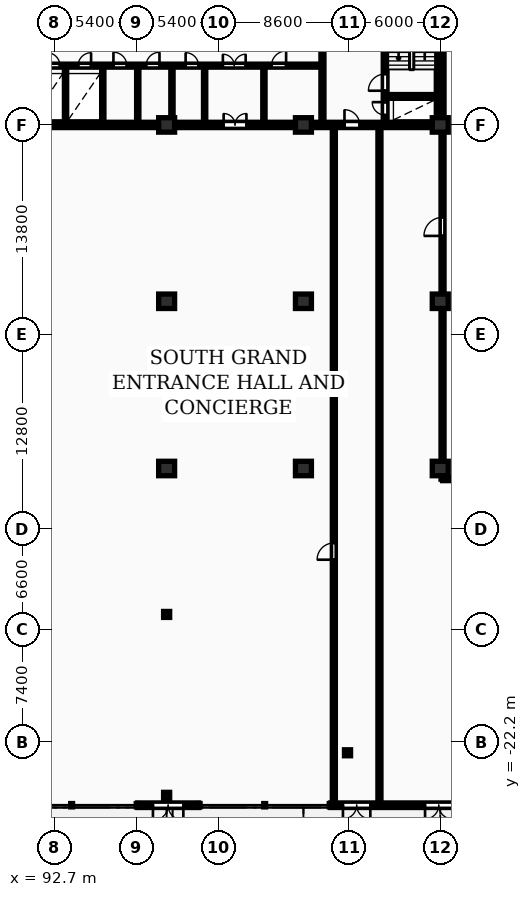
"""IFC4 building model, lengths in metres.
Left out: names, types, materials, properties, quantities, classifications, styles, units other than length and angle.
Written with IfcOpenShell. Run it as: python <this file> out.ifc"""

import sys

from ifc_helpers import new_model, si_unit, direction, frame, frame_2d, origin, origin_2d, place, context, subcontext, project, spatial, rectangle, i_section, extrude, element, fill, save


model = new_model("IFC4")
c1 = context("Model", 3, precision=1e-05, world=origin(), true_north=direction((0.0, 1.0)))
c2 = subcontext(c1, "Body", "Model", "MODEL_VIEW")
j1 = project(units=[si_unit("LENGTHUNIT", "METRE"), si_unit("PLANEANGLEUNIT", "RADIAN")], contexts=[c1])
p1 = place(None, origin())
s1 = spatial("IfcSite", under=j1, at=p1, CompositionType="ELEMENT")
p2 = place(p1, origin())
s2 = spatial("IfcBuilding", under=s1, at=p2, CompositionType="ELEMENT")
p3 = place(p2, origin())
s3 = spatial("IfcBuildingStorey", under=s2, at=p3, CompositionType="ELEMENT", Elevation=0.0)
for number, where, z_axis, x_axis in (
    (1, (100.1, -4.2, 0.0), (0.0, 0.0, 1.0), (1.0, 0.0, 0.0)),
    (2, (100.1, 6.8, 0.0), (0.0, 0.0, 1.0), (1.0, 0.0, 0.0)),
    (3, (100.1, 18.4, 0.0), (0.0, 0.0, 1.0), (1.0, 0.0, 0.0)),
    (4, (109.1, -4.2, 0.0), (0.0, 0.0, 1.0), (1.0, 0.0, 0.0)),
    (5, (109.1, 6.8, 0.0), (0.0, 0.0, 1.0), (1.0, 0.0, 0.0)),
    (6, (109.1, 18.4, 0.0), (0.0, 0.0, 1.0), (1.0, 0.0, 0.0)),
    (7, (118.1, -4.2, 0.0), (0.0, 0.0, 1.0), (1.0, 0.0, 0.0)),
    (8, (118.1, 6.8, 0.0), (0.0, 0.0, 1.0), (1.0, 0.0, 0.0)),
    (9, (118.1, 18.4, 0.0), (0.0, 0.0, 1.0), (1.0, 0.0, 0.0)),
):
    element("IfcColumn", number, at=place(p3, frame(where, z_axis=z_axis, x_axis=x_axis)), inside=s3, PredefinedType="COLUMN", context=c2, shape_type="SweptSolid", body=[
        extrude(rectangle(XDim=1.05, YDim=0.95, at=origin_2d()), origin(), (0.0, 0.0, 1.0), 5.4),
    ])
for number, where, z_axis, x_axis in (
    (10, (100.1, -13.8, 0.0), (0.0, 0.0, 1.0), (1.0, 0.0, 0.0)),
    (11, (112.0, -22.9, 0.0), (0.0, 0.0, 1.0), (1.0, 0.0, 0.0)),
    (12, (100.1, -25.7, 0.0), (0.0, 0.0, 1.0), (1.0, 0.0, 0.0)),
):
    element("IfcColumn", number, at=place(p3, frame(where, z_axis=z_axis, x_axis=x_axis)), inside=s3, PredefinedType="COLUMN", context=c2, shape_type="SweptSolid", body=[
        extrude(i_section(OverallWidth=0.399, OverallDepth=0.394, WebThickness=0.023, FlangeThickness=0.037, FilletRadius=0.015, at=origin_2d()), origin(), (0.0, 0.0, 1.0), 5.4),
    ])
p4 = place(p3, frame((98.2, -26.35, 0.0), z_axis=(0.0, 0.0, 1.0), x_axis=(1.0, 0.0, 0.0)))
e13 = element("IfcWall", 13, at=p4, inside=s3, PredefinedType="STANDARD", context=c2, shape_type="SweptSolid", body=[
    extrude(rectangle(XDim=4.0, YDim=0.3, at=frame_2d((2.0, 0.0))), origin(), (0.0, 0.0, 1.0), 5.1),
])
p5 = place(p4, frame((1.0, 0.0, 0.0)))
e14 = element("IfcOpeningElement", 14, at=p5, cuts=e13, PredefinedType="OPENING", context=c2, shape_type="SweptSolid", body=[
    extrude(rectangle(XDim=2.0, YDim=2.6, at=frame_2d((1.0, 1.3))), frame((0.0, 0.16, 0.0), z_axis=(0.0, -1.0, 0.0), x_axis=(1.0, 0.0, 0.0)), (0.0, 0.0, 1.0), 0.32),
])
p6 = place(p3, frame((110.9, -26.35, 0.0), z_axis=(0.0, 0.0, 1.0), x_axis=(1.0, 0.0, 0.0)))
e15 = element("IfcWall", 15, at=p6, inside=s3, PredefinedType="STANDARD", context=c2, shape_type="SweptSolid", body=[
    extrude(rectangle(XDim=42.6, YDim=0.3, at=frame_2d((21.3, 0.0))), origin(), (0.0, 0.0, 1.0), 5.1),
])
p7 = place(p6, frame((0.8, 0.0, 0.0)))
e16 = element("IfcOpeningElement", 16, at=p7, cuts=e15, PredefinedType="OPENING", context=c2, shape_type="SweptSolid", body=[
    extrude(rectangle(XDim=1.8, YDim=2.2, at=frame_2d((0.9, 1.1))), frame((0.0, 0.16, 0.0), z_axis=(0.0, -1.0, 0.0), x_axis=(1.0, 0.0, 0.0)), (0.0, 0.0, 1.0), 0.32),
])
p8 = place(p6, frame((6.2, 0.0, 0.0)))
e17 = element("IfcOpeningElement", 17, at=p8, cuts=e15, PredefinedType="OPENING", context=c2, shape_type="SweptSolid", body=[
    extrude(rectangle(XDim=1.8, YDim=2.2, at=frame_2d((0.9, 1.1))), frame((0.0, 0.16, 0.0), z_axis=(0.0, -1.0, 0.0), x_axis=(1.0, 0.0, 0.0)), (0.0, 0.0, 1.0), 0.32),
])
p9 = place(p6, frame((16.0, 0.0, 0.0)))
e18 = element("IfcOpeningElement", 18, at=p9, cuts=e15, PredefinedType="OPENING", context=c2, shape_type="SweptSolid", body=[
    extrude(rectangle(XDim=2.0, YDim=2.6, at=frame_2d((1.0, 1.3))), frame((0.0, 0.16, 0.0), z_axis=(0.0, -1.0, 0.0), x_axis=(1.0, 0.0, 0.0)), (0.0, 0.0, 1.0), 0.32),
])
p10 = place(p6, frame((31.0, 0.0, 0.0)))
e19 = element("IfcOpeningElement", 19, at=p10, cuts=e15, PredefinedType="OPENING", context=c2, shape_type="SweptSolid", body=[
    extrude(rectangle(XDim=2.0, YDim=2.6, at=frame_2d((1.0, 1.3))), frame((0.0, 0.16, 0.0), z_axis=(0.0, -1.0, 0.0), x_axis=(1.0, 0.0, 0.0)), (0.0, 0.0, 1.0), 0.32),
])
p11 = place(p6, frame((24.0, 0.0, 0.9)))
e20 = element("IfcOpeningElement", 20, at=p11, cuts=e15, PredefinedType="OPENING", context=c2, shape_type="SweptSolid", body=[
    extrude(rectangle(XDim=3.0, YDim=2.6, at=frame_2d((1.5, 1.3))), frame((0.0, 0.16, 0.0), z_axis=(0.0, -1.0, 0.0), x_axis=(1.0, 0.0, 0.0)), (0.0, 0.0, 1.0), 0.32),
])
p12 = place(p3, frame((118.015, 18.575, 0.0), z_axis=(0.0, 0.0, 1.0), x_axis=(0.0, 1.0, 0.0)))
e21 = element("IfcWall", 21, at=p12, inside=s3, PredefinedType="SHEAR", context=c2, shape_type="SweptSolid", body=[
    extrude(rectangle(XDim=11.65, YDim=0.35, at=frame_2d((5.825, 0.0))), origin(), (0.0, 0.0, 1.0), 5.4),
])
p13 = place(p3, frame((81.925, 18.4, 0.0), z_axis=(0.0, 0.0, 1.0), x_axis=(1.0, 0.0, 0.0)))
e22 = element("IfcWall", 22, at=p13, inside=s3, PredefinedType="SHEAR", context=c2, shape_type="SweptSolid", body=[
    extrude(rectangle(XDim=36.265, YDim=0.35, at=frame_2d((18.132, 0.0))), origin(), (0.0, 0.0, 1.0), 5.4),
])
p14 = place(p13, frame((5.675, 0.0, 0.0)))
e23 = element("IfcOpeningElement", 23, at=p14, cuts=e22, PredefinedType="OPENING", context=c2, shape_type="SweptSolid", body=[
    extrude(rectangle(XDim=1.0, YDim=2.15, at=frame_2d((0.5, 1.075))), frame((0.0, 0.185, 0.0), z_axis=(0.0, -1.0, 0.0), x_axis=(1.0, 0.0, 0.0)), (0.0, 0.0, 1.0), 0.37),
])
p15 = place(p13, frame((21.925, 0.0, 0.0)))
e24 = element("IfcOpeningElement", 24, at=p15, cuts=e22, PredefinedType="OPENING", context=c2, shape_type="SweptSolid", body=[
    extrude(rectangle(XDim=1.5, YDim=2.2, at=frame_2d((0.75, 1.1))), frame((0.0, 0.185, 0.0), z_axis=(0.0, -1.0, 0.0), x_axis=(1.0, 0.0, 0.0)), (0.0, 0.0, 1.0), 0.37),
])
p16 = place(p13, frame((29.875, 0.0, 0.0)))
e25 = element("IfcOpeningElement", 25, at=p16, cuts=e22, PredefinedType="OPENING", context=c2, shape_type="SweptSolid", body=[
    extrude(rectangle(XDim=1.0, YDim=2.15, at=frame_2d((0.5, 1.075))), frame((0.0, 0.185, 0.0), z_axis=(0.0, -1.0, 0.0), x_axis=(1.0, 0.0, 0.0)), (0.0, 0.0, 1.0), 0.37),
])
for number, where, z_axis, x_axis in (
    (26, (93.45, 18.6, 0.0), (0.0, 0.0, 1.0), (0.0, 1.0, 0.0)),
    (27, (95.9, 18.6, 0.0), (0.0, 0.0, 1.0), (0.0, 1.0, 0.0)),
    (28, (98.2, 18.6, 0.0), (0.0, 0.0, 1.0), (0.0, 1.0, 0.0)),
):
    element("IfcWall", number, at=place(p3, frame(where, z_axis=z_axis, x_axis=x_axis)), inside=s3, PredefinedType="PARTITIONING", context=c2, shape_type="SweptSolid", body=[
        extrude(rectangle(XDim=3.6, YDim=0.15, at=frame_2d((1.8, 0.0))), origin(), (0.0, 0.0, 1.0), 5.1),
    ])
p17 = place(p3, frame((100.45, 18.6, 0.0), z_axis=(0.0, 0.0, 1.0), x_axis=(0.0, 1.0, 0.0)))
e29 = element("IfcWall", 29, at=p17, inside=s3, PredefinedType="PARTITIONING", context=c2, shape_type="SweptSolid", body=[
    extrude(rectangle(XDim=3.6, YDim=0.15, at=frame_2d((1.8, 0.0))), origin(), (0.0, 0.0, 1.0), 4.35),
])
for number, where, z_axis, x_axis in (
    (30, (102.6, 18.6, 0.0), (0.0, 0.0, 1.0), (0.0, 1.0, 0.0)),
    (31, (106.5, 18.6, 0.0), (0.0, 0.0, 1.0), (0.0, 1.0, 0.0)),
):
    element("IfcWall", number, at=place(p3, frame(where, z_axis=z_axis, x_axis=x_axis)), inside=s3, PredefinedType="PARTITIONING", context=c2, shape_type="SweptSolid", body=[
        extrude(rectangle(XDim=3.6, YDim=0.15, at=frame_2d((1.8, 0.0))), origin(), (0.0, 0.0, 1.0), 5.1),
    ])
p18 = place(p3, frame((91.08, 22.3, 0.0), z_axis=(0.0, 0.0, 1.0), x_axis=(1.0, 0.0, 0.0)))
e32 = element("IfcWall", 32, at=p18, inside=s3, PredefinedType="PARTITIONING", context=c2, shape_type="SweptSolid", body=[
    extrude(rectangle(XDim=19.14, YDim=0.2, at=frame_2d((9.57, 0.0))), origin(), (0.0, 0.0, 1.0), 5.1),
])
p19 = place(p18, frame((1.15, 0.0, 0.0)))
e33 = element("IfcOpeningElement", 33, at=p19, cuts=e32, PredefinedType="OPENING", context=c2, shape_type="SweptSolid", body=[
    extrude(rectangle(XDim=0.85, YDim=2.05, at=frame_2d((0.425, 1.025))), frame((0.0, 0.11, 0.0), z_axis=(0.0, -1.0, 0.0), x_axis=(1.0, 0.0, 0.0)), (0.0, 0.0, 1.0), 0.22),
])
p20 = place(p18, frame((3.2, 0.0, 0.0)))
e34 = element("IfcOpeningElement", 34, at=p20, cuts=e32, PredefinedType="OPENING", context=c2, shape_type="SweptSolid", body=[
    extrude(rectangle(XDim=0.85, YDim=2.05, at=frame_2d((0.425, 1.025))), frame((0.0, 0.11, 0.0), z_axis=(0.0, -1.0, 0.0), x_axis=(1.0, 0.0, 0.0)), (0.0, 0.0, 1.0), 0.22),
])
p21 = place(p18, frame((12.72, 0.0, 0.0)))
e35 = element("IfcOpeningElement", 35, at=p21, cuts=e32, PredefinedType="OPENING", context=c2, shape_type="SweptSolid", body=[
    extrude(rectangle(XDim=1.5, YDim=2.2, at=frame_2d((0.75, 1.1))), frame((0.0, 0.11, 0.0), z_axis=(0.0, -1.0, 0.0), x_axis=(1.0, 0.0, 0.0)), (0.0, 0.0, 1.0), 0.22),
])
p22 = place(p18, frame((5.52, 0.0, 0.0)))
e36 = element("IfcOpeningElement", 36, at=p22, cuts=e32, PredefinedType="OPENING", context=c2, shape_type="SweptSolid", body=[
    extrude(rectangle(XDim=0.88, YDim=2.06, at=frame_2d((0.44, 1.03))), frame((0.0, 0.11, 0.0), z_axis=(0.0, -1.0, 0.0), x_axis=(1.0, 0.0, 0.0)), (0.0, 0.0, 1.0), 0.22),
])
p23 = place(p18, frame((7.67, 0.0, 0.0)))
e37 = element("IfcOpeningElement", 37, at=p23, cuts=e32, PredefinedType="OPENING", context=c2, shape_type="SweptSolid", body=[
    extrude(rectangle(XDim=0.88, YDim=2.06, at=frame_2d((0.44, 1.03))), frame((0.0, 0.11, 0.0), z_axis=(0.0, -1.0, 0.0), x_axis=(1.0, 0.0, 0.0)), (0.0, 0.0, 1.0), 0.22),
])
p24 = place(p18, frame((10.27, 0.0, 0.0)))
e38 = element("IfcOpeningElement", 38, at=p24, cuts=e32, PredefinedType="OPENING", context=c2, shape_type="SweptSolid", body=[
    extrude(rectangle(XDim=0.85, YDim=2.05, at=frame_2d((0.425, 1.025))), frame((0.0, 0.11, 0.0), z_axis=(0.0, -1.0, 0.0), x_axis=(1.0, 0.0, 0.0)), (0.0, 0.0, 1.0), 0.22),
])
p25 = place(p18, frame((15.92, 0.0, 0.0)))
e39 = element("IfcOpeningElement", 39, at=p25, cuts=e32, PredefinedType="OPENING", context=c2, shape_type="SweptSolid", body=[
    extrude(rectangle(XDim=0.96, YDim=2.1, at=frame_2d((0.48, 1.05))), frame((0.0, 0.11, 0.0), z_axis=(0.0, -1.0, 0.0), x_axis=(1.0, 0.0, 0.0)), (0.0, 0.0, 1.0), 0.22),
])
p26 = place(p3, frame((110.35, 18.6, 0.0), z_axis=(0.0, 0.0, 1.0), x_axis=(0.0, 1.0, 0.0)))
e40 = element("IfcWall", 40, at=p26, inside=s3, PredefinedType="PARTITIONING", context=c2, shape_type="SweptSolid", body=[
    extrude(rectangle(XDim=11.6, YDim=0.2, at=frame_2d((5.8, 0.0))), origin(), (0.0, 0.0, 1.0), 5.1),
])
p27 = place(p26, frame((5.2, 0.0, 0.0)))
e41 = element("IfcOpeningElement", 41, at=p27, cuts=e40, PredefinedType="OPENING", context=c2, shape_type="SweptSolid", body=[
    extrude(rectangle(XDim=1.1, YDim=2.15, at=frame_2d((0.55, 1.075))), frame((0.0, 0.11, 0.0), z_axis=(0.0, -1.0, 0.0), x_axis=(1.0, 0.0, 0.0)), (0.0, 0.0, 1.0), 0.22),
])
p28 = place(p3, frame((114.475, 18.6, 0.0), z_axis=(0.0, 0.0, 1.0), x_axis=(0.0, 1.0, 0.0)))
e42 = element("IfcWall", 42, at=p28, inside=s3, PredefinedType="SHEAR", context=c2, shape_type="SweptSolid", body=[
    extrude(rectangle(XDim=11.6, YDim=0.25, at=frame_2d((5.8, 0.0))), origin(), (0.0, 0.0, 1.0), 5.4),
])
p29 = place(p28, frame((0.45, 0.0, 0.0)))
e43 = element("IfcOpeningElement", 43, at=p29, cuts=e42, PredefinedType="OPENING", context=c2, shape_type="SweptSolid", body=[
    extrude(rectangle(XDim=0.85, YDim=2.05, at=frame_2d((0.425, 1.025))), frame((0.0, 0.135, 0.0), z_axis=(0.0, -1.0, 0.0), x_axis=(1.0, 0.0, 0.0)), (0.0, 0.0, 1.0), 0.27),
])
p30 = place(p28, frame((2.05, 0.0, 0.0)))
e44 = element("IfcOpeningElement", 44, at=p30, cuts=e42, PredefinedType="OPENING", context=c2, shape_type="SweptSolid", body=[
    extrude(rectangle(XDim=1.1, YDim=2.1, at=frame_2d((0.55, 1.05))), frame((0.0, 0.135, 0.0), z_axis=(0.0, -1.0, 0.0), x_axis=(1.0, 0.0, 0.0)), (0.0, 0.0, 1.0), 0.27),
])
p31 = place(p28, frame((9.95, 0.0, 0.0)))
e45 = element("IfcOpeningElement", 45, at=p31, cuts=e42, PredefinedType="OPENING", context=c2, shape_type="SweptSolid", body=[
    extrude(rectangle(XDim=0.85, YDim=2.05, at=frame_2d((0.425, 1.025))), frame((0.0, 0.135, 0.0), z_axis=(0.0, -1.0, 0.0), x_axis=(1.0, 0.0, 0.0)), (0.0, 0.0, 1.0), 0.27),
])
p32 = place(p3, frame((114.6, 20.275, 0.0), z_axis=(0.0, 0.0, 1.0), x_axis=(1.0, 0.0, 0.0)))
e46 = element("IfcWall", 46, at=p32, inside=s3, PredefinedType="SHEAR", context=c2, shape_type="SweptSolid", body=[
    extrude(rectangle(XDim=3.24, YDim=0.25, at=frame_2d((1.62, 0.0))), origin(), (0.0, 0.0, 1.0), 5.4),
])
p33 = place(p3, frame((111.1, -26.2, 0.0), z_axis=(0.0, 0.0, 1.0), x_axis=(0.0, 1.0, 0.0)))
e47 = element("IfcWall", 47, at=p33, inside=s3, PredefinedType="PARTITIONING", context=c2, shape_type="SweptSolid", body=[
    extrude(rectangle(XDim=44.35, YDim=0.2, at=frame_2d((22.175, 0.0))), origin(), (0.0, 0.0, 1.0), 5.1),
])
p34 = place(p33, frame((16.0, 0.0, 0.0)))
e48 = element("IfcOpeningElement", 48, at=p34, cuts=e47, PredefinedType="OPENING", context=c2, shape_type="SweptSolid", body=[
    extrude(rectangle(XDim=1.1, YDim=2.1, at=frame_2d((0.55, 1.05))), frame((0.0, 0.11, 0.0), z_axis=(0.0, -1.0, 0.0), x_axis=(1.0, 0.0, 0.0)), (0.0, 0.0, 1.0), 0.22),
])
p35 = place(p3, frame((114.1, -26.2, 0.0), z_axis=(0.0, 0.0, 1.0), x_axis=(0.0, 1.0, 0.0)))
e49 = element("IfcWall", 49, at=p35, inside=s3, PredefinedType="PARTITIONING", context=c2, shape_type="SweptSolid", body=[
    extrude(rectangle(XDim=44.35, YDim=0.2, at=frame_2d((22.175, 0.0))), origin(), (0.0, 0.0, 1.0), 5.1),
])
p36 = place(p3, frame((118.25, -4.9, 0.0), z_axis=(0.0, 0.0, 1.0), x_axis=(0.0, 1.0, 0.0)))
e50 = element("IfcWall", 50, at=p36, inside=s3, PredefinedType="PARTITIONING", context=c2, shape_type="SweptSolid", body=[
    extrude(rectangle(XDim=35.35, YDim=0.2, at=frame_2d((17.675, 0.0))), origin(), (0.0, 0.0, 1.0), 4.35),
])
p37 = place(p36, frame((16.0, 0.0, 0.0)))
e51 = element("IfcOpeningElement", 51, at=p37, cuts=e50, PredefinedType="OPENING", context=c2, shape_type="SweptSolid", body=[
    extrude(rectangle(XDim=1.22, YDim=2.18, at=frame_2d((0.61, 1.09))), frame((0.0, 0.11, 0.0), z_axis=(0.0, -1.0, 0.0), x_axis=(1.0, 0.0, 0.0)), (0.0, 0.0, 1.0), 0.22),
])
p38 = place(p3, frame((118.25, -4.9, 0.0), z_axis=(0.0, 0.0, 1.0), x_axis=(1.0, 0.0, 0.0)))
e52 = element("IfcWall", 52, at=p38, inside=s3, PredefinedType="PARTITIONING", context=c2, shape_type="SweptSolid", body=[
    extrude(rectangle(XDim=12.45, YDim=0.2, at=frame_2d((6.225, 0.0))), origin(), (0.0, 0.0, 1.0), 5.1),
])
p39 = place(p5, frame((2.0, 0.0, 0.0), z_axis=(0.0, 0.0, 1.0), x_axis=(-1.0, 0.0, 0.0)))
e53 = element("IfcDoor", 53, at=p39, inside=s3, OperationType="DOUBLE_DOOR_SINGLE_SWING", PredefinedType="DOOR", context=c2, shape_type="SweptSolid", body=[
    extrude(rectangle(XDim=2.0, YDim=2.6, at=frame_2d((1.0, 1.3))), frame((0.0, 0.025, 0.0), z_axis=(0.0, -1.0, 0.0), x_axis=(1.0, 0.0, 0.0)), (0.0, 0.0, 1.0), 0.05),
])
fill(e14, e53)
p40 = place(p7, frame((1.8, 0.0, 0.0), z_axis=(0.0, 0.0, 1.0), x_axis=(-1.0, 0.0, 0.0)))
e54 = element("IfcDoor", 54, at=p40, inside=s3, OperationType="DOUBLE_DOOR_SINGLE_SWING", PredefinedType="DOOR", context=c2, shape_type="SweptSolid", body=[
    extrude(rectangle(XDim=1.8, YDim=2.2, at=frame_2d((0.9, 1.1))), frame((0.0, 0.025, 0.0), z_axis=(0.0, -1.0, 0.0), x_axis=(1.0, 0.0, 0.0)), (0.0, 0.0, 1.0), 0.05),
])
fill(e16, e54)
p41 = place(p8, frame((1.8, 0.0, 0.0), z_axis=(0.0, 0.0, 1.0), x_axis=(-1.0, 0.0, 0.0)))
e55 = element("IfcDoor", 55, at=p41, inside=s3, OperationType="DOUBLE_DOOR_SINGLE_SWING", PredefinedType="DOOR", context=c2, shape_type="SweptSolid", body=[
    extrude(rectangle(XDim=1.8, YDim=2.2, at=frame_2d((0.9, 1.1))), frame((0.0, 0.025, 0.0), z_axis=(0.0, -1.0, 0.0), x_axis=(1.0, 0.0, 0.0)), (0.0, 0.0, 1.0), 0.05),
])
fill(e17, e55)
p42 = place(p15, origin())
e56 = element("IfcDoor", 56, at=p42, inside=s3, OperationType="DOUBLE_DOOR_SINGLE_SWING", PredefinedType="DOOR", context=c2, shape_type="SweptSolid", body=[
    extrude(rectangle(XDim=1.5, YDim=2.2, at=frame_2d((0.75, 1.1))), frame((0.0, 0.025, 0.0), z_axis=(0.0, -1.0, 0.0), x_axis=(1.0, 0.0, 0.0)), (0.0, 0.0, 1.0), 0.05),
])
fill(e24, e56)
p43 = place(p16, origin())
e57 = element("IfcDoor", 57, at=p43, inside=s3, OperationType="SINGLE_SWING_LEFT", PredefinedType="DOOR", context=c2, shape_type="SweptSolid", body=[
    extrude(rectangle(XDim=1.0, YDim=2.15, at=frame_2d((0.5, 1.075))), frame((0.0, 0.025, 0.0), z_axis=(0.0, -1.0, 0.0), x_axis=(1.0, 0.0, 0.0)), (0.0, 0.0, 1.0), 0.05),
])
fill(e25, e57)
p44 = place(p19, origin())
e58 = element("IfcDoor", 58, at=p44, inside=s3, OperationType="SINGLE_SWING_LEFT", PredefinedType="DOOR", context=c2, shape_type="SweptSolid", body=[
    extrude(rectangle(XDim=0.85, YDim=2.05, at=frame_2d((0.425, 1.025))), frame((0.0, 0.025, 0.0), z_axis=(0.0, -1.0, 0.0), x_axis=(1.0, 0.0, 0.0)), (0.0, 0.0, 1.0), 0.05),
])
fill(e33, e58)
p45 = place(p20, origin())
e59 = element("IfcDoor", 59, at=p45, inside=s3, OperationType="SINGLE_SWING_RIGHT", PredefinedType="DOOR", context=c2, shape_type="SweptSolid", body=[
    extrude(rectangle(XDim=0.85, YDim=2.05, at=frame_2d((0.425, 1.025))), frame((0.0, 0.025, 0.0), z_axis=(0.0, -1.0, 0.0), x_axis=(1.0, 0.0, 0.0)), (0.0, 0.0, 1.0), 0.05),
])
fill(e34, e59)
p46 = place(p21, origin())
e60 = element("IfcDoor", 60, at=p46, inside=s3, OperationType="DOUBLE_DOOR_SINGLE_SWING", PredefinedType="DOOR", context=c2, shape_type="SweptSolid", body=[
    extrude(rectangle(XDim=1.5, YDim=2.2, at=frame_2d((0.75, 1.1))), frame((0.0, 0.025, 0.0), z_axis=(0.0, -1.0, 0.0), x_axis=(1.0, 0.0, 0.0)), (0.0, 0.0, 1.0), 0.05),
])
fill(e35, e60)
p47 = place(p22, origin())
e61 = element("IfcDoor", 61, at=p47, inside=s3, OperationType="SINGLE_SWING_LEFT", PredefinedType="DOOR", context=c2, shape_type="SweptSolid", body=[
    extrude(rectangle(XDim=0.88, YDim=2.06, at=frame_2d((0.44, 1.03))), frame((0.0, 0.025, 0.0), z_axis=(0.0, -1.0, 0.0), x_axis=(1.0, 0.0, 0.0)), (0.0, 0.0, 1.0), 0.05),
])
fill(e36, e61)
p48 = place(p23, origin())
e62 = element("IfcDoor", 62, at=p48, inside=s3, OperationType="SINGLE_SWING_RIGHT", PredefinedType="DOOR", context=c2, shape_type="SweptSolid", body=[
    extrude(rectangle(XDim=0.88, YDim=2.06, at=frame_2d((0.44, 1.03))), frame((0.0, 0.025, 0.0), z_axis=(0.0, -1.0, 0.0), x_axis=(1.0, 0.0, 0.0)), (0.0, 0.0, 1.0), 0.05),
])
fill(e37, e62)
p49 = place(p24, origin())
e63 = element("IfcDoor", 63, at=p49, inside=s3, OperationType="SINGLE_SWING_LEFT", PredefinedType="DOOR", context=c2, shape_type="SweptSolid", body=[
    extrude(rectangle(XDim=0.85, YDim=2.05, at=frame_2d((0.425, 1.025))), frame((0.0, 0.025, 0.0), z_axis=(0.0, -1.0, 0.0), x_axis=(1.0, 0.0, 0.0)), (0.0, 0.0, 1.0), 0.05),
])
fill(e38, e63)
p50 = place(p25, origin())
e64 = element("IfcDoor", 64, at=p50, inside=s3, OperationType="SINGLE_SWING_RIGHT", PredefinedType="DOOR", context=c2, shape_type="SweptSolid", body=[
    extrude(rectangle(XDim=0.96, YDim=2.1, at=frame_2d((0.48, 1.05))), frame((0.0, 0.025, 0.0), z_axis=(0.0, -1.0, 0.0), x_axis=(1.0, 0.0, 0.0)), (0.0, 0.0, 1.0), 0.05),
])
fill(e39, e64)
p51 = place(p29, origin())
e65 = element("IfcDoor", 65, at=p51, inside=s3, OperationType="SINGLE_SWING_RIGHT", PredefinedType="DOOR", context=c2, shape_type="SweptSolid", body=[
    extrude(rectangle(XDim=0.85, YDim=2.05, at=frame_2d((0.425, 1.025))), frame((0.0, 0.025, 0.0), z_axis=(0.0, -1.0, 0.0), x_axis=(1.0, 0.0, 0.0)), (0.0, 0.0, 1.0), 0.05),
])
fill(e43, e65)
p52 = place(p30, origin())
e66 = element("IfcDoor", 66, at=p52, inside=s3, OperationType="SINGLE_SWING_LEFT", PredefinedType="DOOR", context=c2, shape_type="SweptSolid", body=[
    extrude(rectangle(XDim=1.1, YDim=2.1, at=frame_2d((0.55, 1.05))), frame((0.0, 0.025, 0.0), z_axis=(0.0, -1.0, 0.0), x_axis=(1.0, 0.0, 0.0)), (0.0, 0.0, 1.0), 0.05),
])
fill(e44, e66)
p53 = place(p34, origin())
e67 = element("IfcDoor", 67, at=p53, inside=s3, OperationType="SINGLE_SWING_LEFT", PredefinedType="DOOR", context=c2, shape_type="SweptSolid", body=[
    extrude(rectangle(XDim=1.1, YDim=2.1, at=frame_2d((0.55, 1.05))), frame((0.0, 0.025, 0.0), z_axis=(0.0, -1.0, 0.0), x_axis=(1.0, 0.0, 0.0)), (0.0, 0.0, 1.0), 0.05),
])
fill(e48, e67)
p54 = place(p37, origin())
e68 = element("IfcDoor", 68, at=p54, inside=s3, OperationType="SINGLE_SWING_LEFT", PredefinedType="DOOR", context=c2, shape_type="SweptSolid", body=[
    extrude(rectangle(XDim=1.22, YDim=2.18, at=frame_2d((0.61, 1.09))), frame((0.0, 0.025, 0.0), z_axis=(0.0, -1.0, 0.0), x_axis=(1.0, 0.0, 0.0)), (0.0, 0.0, 1.0), 0.05),
])
fill(e51, e68)
save(model, sys.argv[1])
